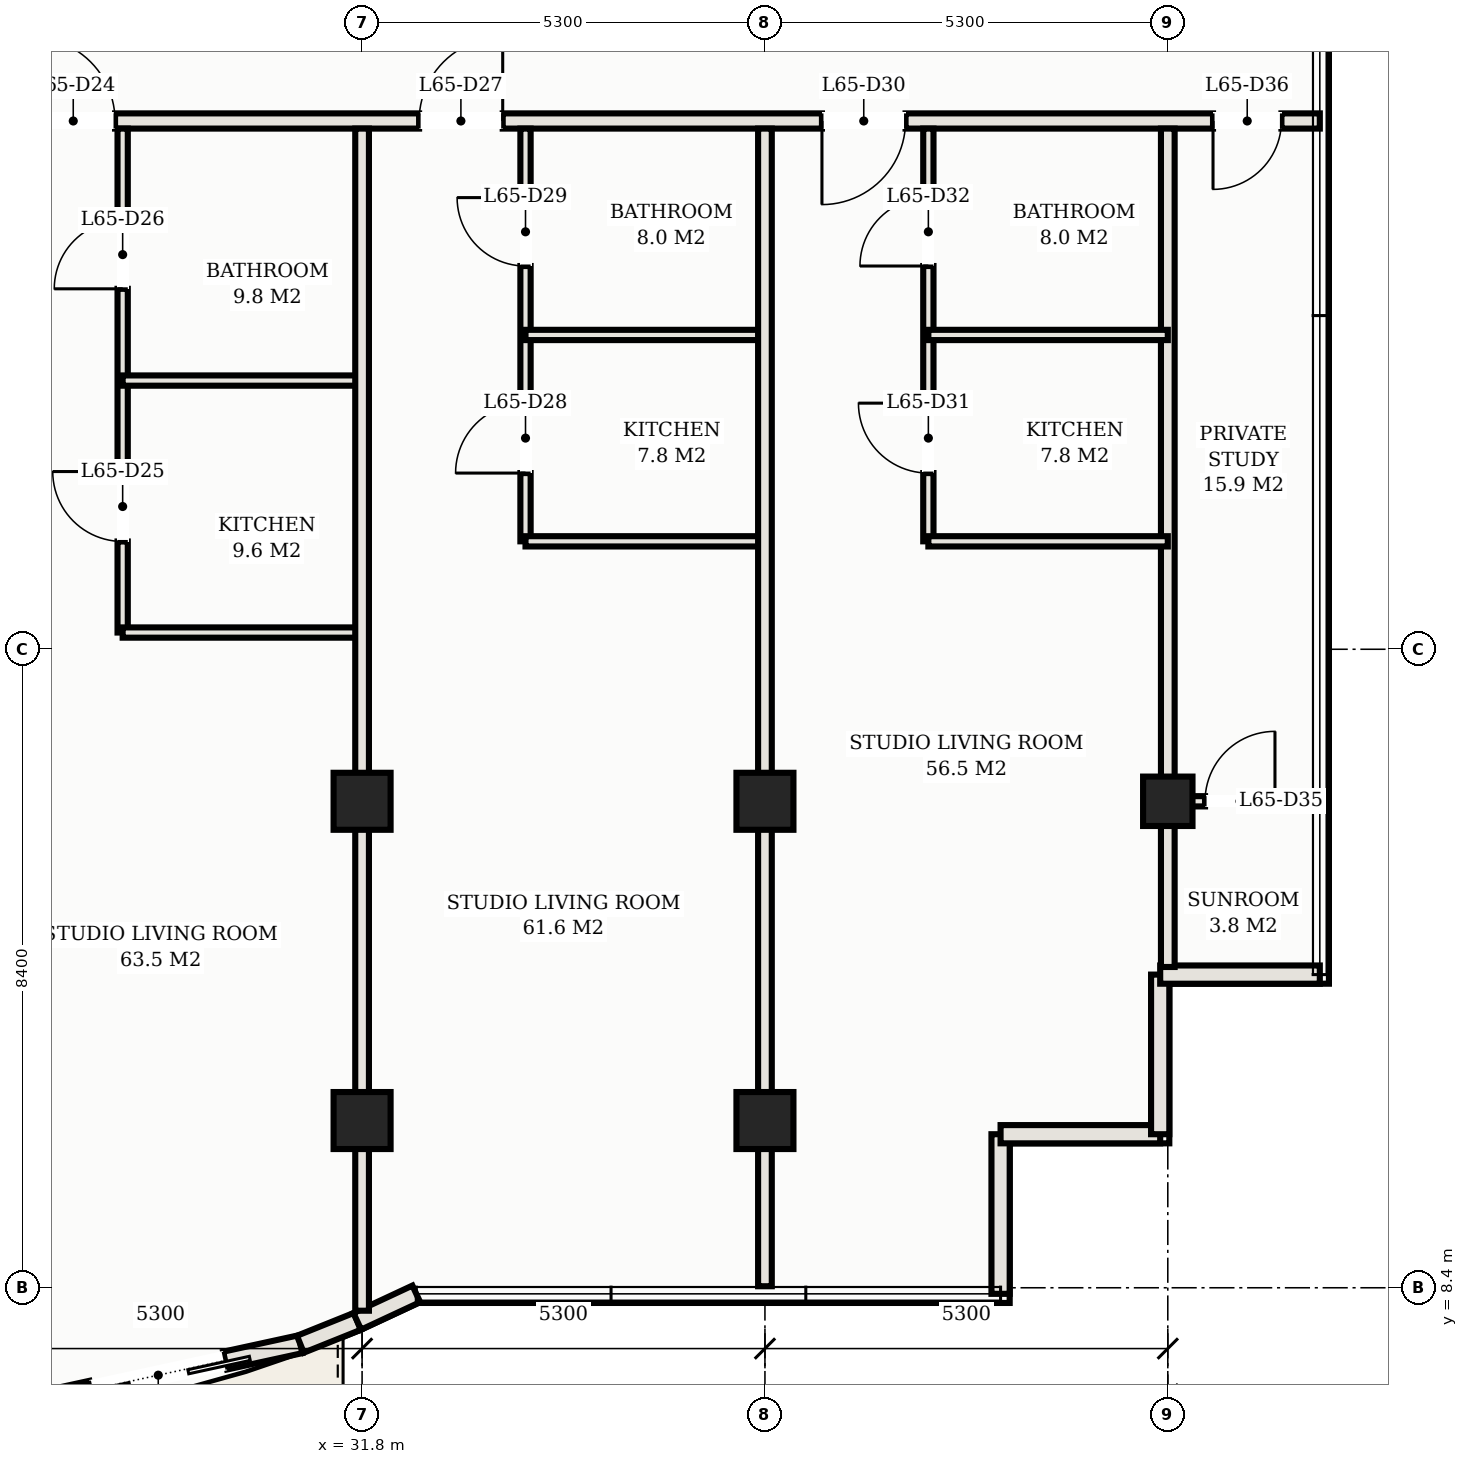
"""IFC4 building model, lengths in metres.
Left out: names, types, materials, properties, quantities, classifications, styles, units other than length and angle.
Written with IfcOpenShell. Run it as: python <this file> out.ifc"""

import sys

from ifc_helpers import new_model, si_unit, direction, frame, frame_2d, origin, origin_2d, place, context, subcontext, project, spatial, rectangle, hollow_rectangle, extrude, element, fill, save


model = new_model("IFC4")
c1 = context("Model", 3, precision=1e-05, world=origin(), true_north=direction((0.0, 1.0)))
c2 = subcontext(c1, "Body", "Model", "MODEL_VIEW")
j1 = project(units=[si_unit("LENGTHUNIT", "METRE"), si_unit("PLANEANGLEUNIT", "RADIAN")], contexts=[c1])
p1 = place(None, origin())
s1 = spatial("IfcSite", under=j1, at=p1, CompositionType="ELEMENT")
p2 = place(p1, origin())
s2 = spatial("IfcBuilding", under=s1, at=p2, CompositionType="ELEMENT")
p3 = place(p2, frame((0.0, 0.0, 236.3)))
s3 = spatial("IfcBuildingStorey", under=s2, at=p3, CompositionType="ELEMENT", Elevation=236.3)
for number, where, z_axis, x_axis in (
    (1, (31.8, 14.8, 0.0), (0.0, 0.0, 1.0), (1.0, 0.0, 0.0)),
    (2, (31.8, 10.6, 0.0), (0.0, 0.0, 1.0), (1.0, 0.0, 0.0)),
    (3, (37.1, 14.8, 0.0), (0.0, 0.0, 1.0), (1.0, 0.0, 0.0)),
    (4, (37.1, 10.6, 0.0), (0.0, 0.0, 1.0), (1.0, 0.0, 0.0)),
):
    element("IfcColumn", number, at=place(p3, frame(where, z_axis=z_axis, x_axis=x_axis)), inside=s3, PredefinedType="COLUMN", context=c2, shape_type="SweptSolid", body=[
        extrude(hollow_rectangle(XDim=0.75, YDim=0.75, WallThickness=0.025, at=origin_2d()), origin(), (0.0, 0.0, 1.0), 3.3),
    ])
p4 = place(p3, frame((42.4, 14.8, 0.0), z_axis=(0.0, 0.0, 1.0), x_axis=(1.0, 0.0, 0.0)))
e5 = element("IfcColumn", 5, at=p4, inside=s3, PredefinedType="COLUMN", context=c2, shape_type="SweptSolid", body=[
    extrude(hollow_rectangle(XDim=0.65, YDim=0.65, WallThickness=0.022, at=origin_2d()), origin(), (0.0, 0.0, 1.0), 3.3),
])
p5 = place(p3, frame((27.248, 6.843, 0.0), z_axis=(0.0, 0.0, 1.0), x_axis=(0.977126252677, 0.212660025225, 0.0)))
e6 = element("IfcWall", 6, at=p5, inside=s3, PredefinedType="SOLIDWALL", context=c2, shape_type="SweptSolid", body=[
    extrude(rectangle(XDim=3.828, YDim=0.24, at=frame_2d((1.914, 0.0))), origin(), (0.0, 0.0, 1.0), 3.11),
])
p6 = place(p5, frame((1.014, 0.0, 0.0)))
e7 = element("IfcOpeningElement", 7, at=p6, cuts=e6, PredefinedType="OPENING", context=c2, shape_type="SweptSolid", body=[
    extrude(rectangle(XDim=1.8, YDim=2.2, at=frame_2d((0.9, 1.1))), frame((0.0, 0.13, 0.0), z_axis=(0.0, -1.0, 0.0), x_axis=(1.0, 0.0, 0.0)), (0.0, 0.0, 1.0), 0.26),
])
p7 = place(p3, frame((30.988, 7.657, 0.0), z_axis=(0.0, 0.0, 1.0), x_axis=(0.927870589467, 0.372902358805, 0.0)))
e8 = element("IfcWall", 8, at=p7, inside=s3, PredefinedType="SOLIDWALL", context=c2, shape_type="SweptSolid", body=[
    extrude(rectangle(XDim=0.807, YDim=0.24, at=frame_2d((0.404, 0.0))), origin(), (0.0, 0.0, 1.0), 3.11),
])
p8 = place(p3, frame((31.737, 7.958, 0.0), z_axis=(0.0, 0.0, 1.0), x_axis=(0.906190424584, 0.422869855147, 0.0)))
e9 = element("IfcWall", 9, at=p8, inside=s3, PredefinedType="SOLIDWALL", context=c2, shape_type="SweptSolid", body=[
    extrude(rectangle(XDim=0.856, YDim=0.24, at=frame_2d((0.428, 0.0))), origin(), (0.0, 0.0, 1.0), 3.11),
])
p9 = place(p3, frame((40.2, 8.32, 0.0), z_axis=(0.0, 0.0, 1.0), x_axis=(0.0, 1.0, 0.0)))
e10 = element("IfcWall", 10, at=p9, inside=s3, PredefinedType="SOLIDWALL", context=c2, shape_type="SweptSolid", body=[
    extrude(rectangle(XDim=2.1, YDim=0.24, at=frame_2d((1.05, 0.0))), origin(), (0.0, 0.0, 1.0), 3.11),
])
for number, where, z_axis, x_axis in (
    (11, (40.2, 10.42, 0.0), (0.0, 0.0, 1.0), (1.0, 0.0, 0.0)),
    (12, (42.3, 10.42, 0.0), (0.0, 0.0, 1.0), (0.0, 1.0, 0.0)),
):
    element("IfcWall", number, at=place(p3, frame(where, z_axis=z_axis, x_axis=x_axis)), inside=s3, PredefinedType="SOLIDWALL", context=c2, shape_type="SweptSolid", body=[
        extrude(rectangle(XDim=2.1, YDim=0.24, at=frame_2d((1.05, 0.0))), origin(), (0.0, 0.0, 1.0), 3.11),
    ])
p10 = place(p3, frame((42.3, 12.52, 0.0), z_axis=(0.0, 0.0, 1.0), x_axis=(1.0, 0.0, 0.0)))
e13 = element("IfcWall", 13, at=p10, inside=s3, PredefinedType="SOLIDWALL", context=c2, shape_type="SweptSolid", body=[
    extrude(rectangle(XDim=2.1, YDim=0.24, at=frame_2d((1.05, 0.0))), origin(), (0.0, 0.0, 1.0), 3.11),
])
p11 = place(p3, frame((8.6, 23.75, 0.0), z_axis=(0.0, 0.0, 1.0), x_axis=(1.0, 0.0, 0.0)))
e14 = element("IfcWall", 14, at=p11, inside=s3, PredefinedType="PARTITIONING", context=c2, shape_type="SweptSolid", body=[
    extrude(rectangle(XDim=35.8, YDim=0.2, at=frame_2d((17.9, 0.0))), origin(), (0.0, 0.0, 1.0), 2.45),
])
p12 = place(p11, frame((2.75, 0.0, 0.0)))
e15 = element("IfcOpeningElement", 15, at=p12, cuts=e14, PredefinedType="OPENING", context=c2, shape_type="SweptSolid", body=[
    extrude(rectangle(XDim=1.1, YDim=2.25, at=frame_2d((0.55, 1.125))), frame((0.0, 0.11, 0.0), z_axis=(0.0, -1.0, 0.0), x_axis=(1.0, 0.0, 0.0)), (0.0, 0.0, 1.0), 0.22),
])
p13 = place(p11, frame((8.05, 0.0, 0.0)))
e16 = element("IfcOpeningElement", 16, at=p13, cuts=e14, PredefinedType="OPENING", context=c2, shape_type="SweptSolid", body=[
    extrude(rectangle(XDim=1.1, YDim=2.25, at=frame_2d((0.55, 1.125))), frame((0.0, 0.11, 0.0), z_axis=(0.0, -1.0, 0.0), x_axis=(1.0, 0.0, 0.0)), (0.0, 0.0, 1.0), 0.22),
])
p14 = place(p11, frame((13.35, 0.0, 0.0)))
e17 = element("IfcOpeningElement", 17, at=p14, cuts=e14, PredefinedType="OPENING", context=c2, shape_type="SweptSolid", body=[
    extrude(rectangle(XDim=1.1, YDim=2.25, at=frame_2d((0.55, 1.125))), frame((0.0, 0.11, 0.0), z_axis=(0.0, -1.0, 0.0), x_axis=(1.0, 0.0, 0.0)), (0.0, 0.0, 1.0), 0.22),
])
p15 = place(p11, frame((18.85, 0.0, 0.0)))
e18 = element("IfcOpeningElement", 18, at=p15, cuts=e14, PredefinedType="OPENING", context=c2, shape_type="SweptSolid", body=[
    extrude(rectangle(XDim=1.1, YDim=2.25, at=frame_2d((0.55, 1.125))), frame((0.0, 0.11, 0.0), z_axis=(0.0, -1.0, 0.0), x_axis=(1.0, 0.0, 0.0)), (0.0, 0.0, 1.0), 0.22),
])
p16 = place(p11, frame((23.95, 0.0, 0.0)))
e19 = element("IfcOpeningElement", 19, at=p16, cuts=e14, PredefinedType="OPENING", context=c2, shape_type="SweptSolid", body=[
    extrude(rectangle(XDim=1.1, YDim=2.25, at=frame_2d((0.55, 1.125))), frame((0.0, 0.11, 0.0), z_axis=(0.0, -1.0, 0.0), x_axis=(1.0, 0.0, 0.0)), (0.0, 0.0, 1.0), 0.22),
])
p17 = place(p11, frame((29.25, 0.0, 0.0)))
e20 = element("IfcOpeningElement", 20, at=p17, cuts=e14, PredefinedType="OPENING", context=c2, shape_type="SweptSolid", body=[
    extrude(rectangle(XDim=1.1, YDim=2.25, at=frame_2d((0.55, 1.125))), frame((0.0, 0.11, 0.0), z_axis=(0.0, -1.0, 0.0), x_axis=(1.0, 0.0, 0.0)), (0.0, 0.0, 1.0), 0.22),
])
p18 = place(p11, frame((0.505, 0.0, 0.0)))
e21 = element("IfcOpeningElement", 21, at=p18, cuts=e14, PredefinedType="OPENING", context=c2, shape_type="SweptSolid", body=[
    extrude(rectangle(XDim=0.9, YDim=2.15, at=frame_2d((0.45, 1.075))), frame((0.0, 0.11, 0.0), z_axis=(0.0, -1.0, 0.0), x_axis=(1.0, 0.0, 0.0)), (0.0, 0.0, 1.0), 0.22),
])
p19 = place(p11, frame((34.395, 0.0, 0.0)))
e22 = element("IfcOpeningElement", 22, at=p19, cuts=e14, PredefinedType="OPENING", context=c2, shape_type="SweptSolid", body=[
    extrude(rectangle(XDim=0.9, YDim=2.15, at=frame_2d((0.45, 1.075))), frame((0.0, 0.11, 0.0), z_axis=(0.0, -1.0, 0.0), x_axis=(1.0, 0.0, 0.0)), (0.0, 0.0, 1.0), 0.22),
])
p20 = place(p3, frame((42.4, 12.62, 0.0), z_axis=(0.0, 0.0, 1.0), x_axis=(0.0, 1.0, 0.0)))
e23 = element("IfcWall", 23, at=p20, inside=s3, PredefinedType="PARTITIONING", context=c2, shape_type="SweptSolid", body=[
    extrude(rectangle(XDim=11.03, YDim=0.18, at=frame_2d((5.515, 0.0))), origin(), (0.0, 0.0, 1.0), 2.45),
])
p21 = place(p3, frame((28.65, 17.02, 0.0), z_axis=(0.0, 0.0, 1.0), x_axis=(0.0, 1.0, 0.0)))
e24 = element("IfcWall", 24, at=p21, inside=s3, PredefinedType="PARTITIONING", context=c2, shape_type="SweptSolid", body=[
    extrude(rectangle(XDim=6.63, YDim=0.135, at=frame_2d((3.315, 0.0))), origin(), (0.0, 0.0, 1.0), 2.45),
])
p22 = place(p21, frame((1.198, 0.0, 0.0)))
e25 = element("IfcOpeningElement", 25, at=p22, cuts=e24, PredefinedType="OPENING", context=c2, shape_type="SweptSolid", body=[
    extrude(rectangle(XDim=0.92, YDim=2.15, at=frame_2d((0.46, 1.075))), frame((0.0, 0.078, 0.0), z_axis=(0.0, -1.0, 0.0), x_axis=(1.0, 0.0, 0.0)), (0.0, 0.0, 1.0), 0.155),
])
p23 = place(p21, frame((4.522, 0.0, 0.0)))
e26 = element("IfcOpeningElement", 26, at=p23, cuts=e24, PredefinedType="OPENING", context=c2, shape_type="SweptSolid", body=[
    extrude(rectangle(XDim=0.9, YDim=2.15, at=frame_2d((0.45, 1.075))), frame((0.0, 0.078, 0.0), z_axis=(0.0, -1.0, 0.0), x_axis=(1.0, 0.0, 0.0)), (0.0, 0.0, 1.0), 0.155),
])
for number, where, z_axis, x_axis in (
    (27, (28.65, 17.02, 0.0), (0.0, 0.0, 1.0), (1.0, 0.0, 0.0)),
    (28, (28.65, 20.335, 0.0), (0.0, 0.0, 1.0), (1.0, 0.0, 0.0)),
):
    element("IfcWall", number, at=place(p3, frame(where, z_axis=z_axis, x_axis=x_axis)), inside=s3, PredefinedType="PARTITIONING", context=c2, shape_type="SweptSolid", body=[
        extrude(rectangle(XDim=3.15, YDim=0.135, at=frame_2d((1.575, 0.0))), origin(), (0.0, 0.0, 1.0), 2.45),
    ])
p24 = place(p3, frame((31.8, 8.098, 0.0), z_axis=(0.0, 0.0, 1.0), x_axis=(0.0, 1.0, 0.0)))
e29 = element("IfcWall", 29, at=p24, inside=s3, PredefinedType="PARTITIONING", context=c2, shape_type="SweptSolid", body=[
    extrude(rectangle(XDim=15.552, YDim=0.18, at=frame_2d((7.776, 0.0))), origin(), (0.0, 0.0, 1.0), 2.45),
])
p25 = place(p3, frame((33.95, 18.22, 0.0), z_axis=(0.0, 0.0, 1.0), x_axis=(0.0, 1.0, 0.0)))
e30 = element("IfcWall", 30, at=p25, inside=s3, PredefinedType="PARTITIONING", context=c2, shape_type="SweptSolid", body=[
    extrude(rectangle(XDim=5.43, YDim=0.135, at=frame_2d((2.715, 0.0))), origin(), (0.0, 0.0, 1.0), 2.45),
])
p26 = place(p25, frame((0.898, 0.0, 0.0)))
e31 = element("IfcOpeningElement", 31, at=p26, cuts=e30, PredefinedType="OPENING", context=c2, shape_type="SweptSolid", body=[
    extrude(rectangle(XDim=0.92, YDim=2.15, at=frame_2d((0.46, 1.075))), frame((0.0, 0.078, 0.0), z_axis=(0.0, -1.0, 0.0), x_axis=(1.0, 0.0, 0.0)), (0.0, 0.0, 1.0), 0.155),
])
p27 = place(p25, frame((3.622, 0.0, 0.0)))
e32 = element("IfcOpeningElement", 32, at=p27, cuts=e30, PredefinedType="OPENING", context=c2, shape_type="SweptSolid", body=[
    extrude(rectangle(XDim=0.9, YDim=2.15, at=frame_2d((0.45, 1.075))), frame((0.0, 0.078, 0.0), z_axis=(0.0, -1.0, 0.0), x_axis=(1.0, 0.0, 0.0)), (0.0, 0.0, 1.0), 0.155),
])
for number, where, z_axis, x_axis in (
    (33, (33.95, 18.22, 0.0), (0.0, 0.0, 1.0), (1.0, 0.0, 0.0)),
    (34, (33.95, 20.935, 0.0), (0.0, 0.0, 1.0), (1.0, 0.0, 0.0)),
):
    element("IfcWall", number, at=place(p3, frame(where, z_axis=z_axis, x_axis=x_axis)), inside=s3, PredefinedType="PARTITIONING", context=c2, shape_type="SweptSolid", body=[
        extrude(rectangle(XDim=3.15, YDim=0.135, at=frame_2d((1.575, 0.0))), origin(), (0.0, 0.0, 1.0), 2.45),
    ])
p28 = place(p3, frame((37.1, 8.42, 0.0), z_axis=(0.0, 0.0, 1.0), x_axis=(0.0, 1.0, 0.0)))
e35 = element("IfcWall", 35, at=p28, inside=s3, PredefinedType="PARTITIONING", context=c2, shape_type="SweptSolid", body=[
    extrude(rectangle(XDim=15.23, YDim=0.18, at=frame_2d((7.615, 0.0))), origin(), (0.0, 0.0, 1.0), 2.45),
])
p29 = place(p3, frame((39.25, 18.22, 0.0), z_axis=(0.0, 0.0, 1.0), x_axis=(0.0, 1.0, 0.0)))
e36 = element("IfcWall", 36, at=p29, inside=s3, PredefinedType="PARTITIONING", context=c2, shape_type="SweptSolid", body=[
    extrude(rectangle(XDim=5.43, YDim=0.135, at=frame_2d((2.715, 0.0))), origin(), (0.0, 0.0, 1.0), 2.45),
])
p30 = place(p29, frame((0.898, 0.0, 0.0)))
e37 = element("IfcOpeningElement", 37, at=p30, cuts=e36, PredefinedType="OPENING", context=c2, shape_type="SweptSolid", body=[
    extrude(rectangle(XDim=0.92, YDim=2.15, at=frame_2d((0.46, 1.075))), frame((0.0, 0.078, 0.0), z_axis=(0.0, -1.0, 0.0), x_axis=(1.0, 0.0, 0.0)), (0.0, 0.0, 1.0), 0.155),
])
p31 = place(p29, frame((3.622, 0.0, 0.0)))
e38 = element("IfcOpeningElement", 38, at=p31, cuts=e36, PredefinedType="OPENING", context=c2, shape_type="SweptSolid", body=[
    extrude(rectangle(XDim=0.9, YDim=2.15, at=frame_2d((0.45, 1.075))), frame((0.0, 0.078, 0.0), z_axis=(0.0, -1.0, 0.0), x_axis=(1.0, 0.0, 0.0)), (0.0, 0.0, 1.0), 0.155),
])
for number, where, z_axis, x_axis in (
    (39, (39.25, 18.22, 0.0), (0.0, 0.0, 1.0), (1.0, 0.0, 0.0)),
    (40, (39.25, 20.935, 0.0), (0.0, 0.0, 1.0), (1.0, 0.0, 0.0)),
):
    element("IfcWall", number, at=place(p3, frame(where, z_axis=z_axis, x_axis=x_axis)), inside=s3, PredefinedType="PARTITIONING", context=c2, shape_type="SweptSolid", body=[
        extrude(rectangle(XDim=3.15, YDim=0.135, at=frame_2d((1.575, 0.0))), origin(), (0.0, 0.0, 1.0), 2.45),
    ])
p32 = place(p3, frame((42.4, 14.8, 0.0), z_axis=(0.0, 0.0, 1.0), x_axis=(1.0, 0.0, 0.0)))
e41 = element("IfcWall", 41, at=p32, inside=s3, PredefinedType="PARTITIONING", context=c2, shape_type="SweptSolid", body=[
    extrude(rectangle(XDim=1.9, YDim=0.135, at=frame_2d((0.95, 0.0))), origin(), (0.0, 0.0, 1.0), 2.45),
])
p33 = place(p32, frame((0.49, 0.0, 0.0)))
e42 = element("IfcOpeningElement", 42, at=p33, cuts=e41, PredefinedType="OPENING", context=c2, shape_type="SweptSolid", body=[
    extrude(rectangle(XDim=0.92, YDim=2.15, at=frame_2d((0.46, 1.075))), frame((0.0, 0.078, 0.0), z_axis=(0.0, -1.0, 0.0), x_axis=(1.0, 0.0, 0.0)), (0.0, 0.0, 1.0), 0.155),
])
p34 = place(p6, frame((1.8, 0.0, 0.0), z_axis=(0.0, 0.0, 1.0), x_axis=(-1.0, 0.0, 0.0)))
e43 = element("IfcDoor", 43, at=p34, inside=s3, OperationType="DOUBLE_DOOR_SLIDING", PredefinedType="DOOR", context=c2, shape_type="SweptSolid", body=[
    extrude(rectangle(XDim=1.8, YDim=2.2, at=frame_2d((0.9, 1.1))), frame((0.0, 0.025, 0.0), z_axis=(0.0, -1.0, 0.0), x_axis=(1.0, 0.0, 0.0)), (0.0, 0.0, 1.0), 0.05),
])
fill(e7, e43)
p35 = place(p15, origin())
e44 = element("IfcDoor", 44, at=p35, inside=s3, OperationType="SINGLE_SWING_LEFT", PredefinedType="DOOR", context=c2, shape_type="SweptSolid", body=[
    extrude(rectangle(XDim=1.1, YDim=2.25, at=frame_2d((0.55, 1.125))), frame((0.0, 0.025, 0.0), z_axis=(0.0, -1.0, 0.0), x_axis=(1.0, 0.0, 0.0)), (0.0, 0.0, 1.0), 0.05),
])
fill(e18, e44)
p36 = place(p22, origin())
e45 = element("IfcDoor", 45, at=p36, inside=s3, OperationType="SINGLE_SWING_RIGHT", PredefinedType="DOOR", context=c2, shape_type="SweptSolid", body=[
    extrude(rectangle(XDim=0.92, YDim=2.15, at=frame_2d((0.46, 1.075))), frame((0.0, 0.025, 0.0), z_axis=(0.0, -1.0, 0.0), x_axis=(1.0, 0.0, 0.0)), (0.0, 0.0, 1.0), 0.05),
])
fill(e25, e45)
p37 = place(p23, origin())
e46 = element("IfcDoor", 46, at=p37, inside=s3, OperationType="SINGLE_SWING_LEFT", PredefinedType="DOOR", context=c2, shape_type="SweptSolid", body=[
    extrude(rectangle(XDim=0.9, YDim=2.15, at=frame_2d((0.45, 1.075))), frame((0.0, 0.025, 0.0), z_axis=(0.0, -1.0, 0.0), x_axis=(1.0, 0.0, 0.0)), (0.0, 0.0, 1.0), 0.05),
])
fill(e26, e46)
p38 = place(p16, origin())
e47 = element("IfcDoor", 47, at=p38, inside=s3, OperationType="SINGLE_SWING_RIGHT", PredefinedType="DOOR", context=c2, shape_type="SweptSolid", body=[
    extrude(rectangle(XDim=1.1, YDim=2.25, at=frame_2d((0.55, 1.125))), frame((0.0, 0.025, 0.0), z_axis=(0.0, -1.0, 0.0), x_axis=(1.0, 0.0, 0.0)), (0.0, 0.0, 1.0), 0.05),
])
fill(e19, e47)
p39 = place(p26, origin())
e48 = element("IfcDoor", 48, at=p39, inside=s3, OperationType="SINGLE_SWING_LEFT", PredefinedType="DOOR", context=c2, shape_type="SweptSolid", body=[
    extrude(rectangle(XDim=0.92, YDim=2.15, at=frame_2d((0.46, 1.075))), frame((0.0, 0.025, 0.0), z_axis=(0.0, -1.0, 0.0), x_axis=(1.0, 0.0, 0.0)), (0.0, 0.0, 1.0), 0.05),
])
fill(e31, e48)
p40 = place(p27, origin())
e49 = element("IfcDoor", 49, at=p40, inside=s3, OperationType="SINGLE_SWING_RIGHT", PredefinedType="DOOR", context=c2, shape_type="SweptSolid", body=[
    extrude(rectangle(XDim=0.9, YDim=2.15, at=frame_2d((0.45, 1.075))), frame((0.0, 0.025, 0.0), z_axis=(0.0, -1.0, 0.0), x_axis=(1.0, 0.0, 0.0)), (0.0, 0.0, 1.0), 0.05),
])
fill(e32, e49)
p41 = place(p17, frame((1.1, 0.0, 0.0), z_axis=(0.0, 0.0, 1.0), x_axis=(-1.0, 0.0, 0.0)))
e50 = element("IfcDoor", 50, at=p41, inside=s3, OperationType="SINGLE_SWING_RIGHT", PredefinedType="DOOR", context=c2, shape_type="SweptSolid", body=[
    extrude(rectangle(XDim=1.1, YDim=2.25, at=frame_2d((0.55, 1.125))), frame((0.0, 0.025, 0.0), z_axis=(0.0, -1.0, 0.0), x_axis=(1.0, 0.0, 0.0)), (0.0, 0.0, 1.0), 0.05),
])
fill(e20, e50)
p42 = place(p30, origin())
e51 = element("IfcDoor", 51, at=p42, inside=s3, OperationType="SINGLE_SWING_RIGHT", PredefinedType="DOOR", context=c2, shape_type="SweptSolid", body=[
    extrude(rectangle(XDim=0.92, YDim=2.15, at=frame_2d((0.46, 1.075))), frame((0.0, 0.025, 0.0), z_axis=(0.0, -1.0, 0.0), x_axis=(1.0, 0.0, 0.0)), (0.0, 0.0, 1.0), 0.05),
])
fill(e37, e51)
p43 = place(p31, origin())
e52 = element("IfcDoor", 52, at=p43, inside=s3, OperationType="SINGLE_SWING_LEFT", PredefinedType="DOOR", context=c2, shape_type="SweptSolid", body=[
    extrude(rectangle(XDim=0.9, YDim=2.15, at=frame_2d((0.45, 1.075))), frame((0.0, 0.025, 0.0), z_axis=(0.0, -1.0, 0.0), x_axis=(1.0, 0.0, 0.0)), (0.0, 0.0, 1.0), 0.05),
])
fill(e38, e52)
p44 = place(p33, origin())
e53 = element("IfcDoor", 53, at=p44, inside=s3, OperationType="SINGLE_SWING_RIGHT", PredefinedType="DOOR", context=c2, shape_type="SweptSolid", body=[
    extrude(rectangle(XDim=0.92, YDim=2.15, at=frame_2d((0.46, 1.075))), frame((0.0, 0.025, 0.0), z_axis=(0.0, -1.0, 0.0), x_axis=(1.0, 0.0, 0.0)), (0.0, 0.0, 1.0), 0.05),
])
fill(e42, e53)
p45 = place(p19, frame((0.9, 0.0, 0.0), z_axis=(0.0, 0.0, 1.0), x_axis=(-1.0, 0.0, 0.0)))
e54 = element("IfcDoor", 54, at=p45, inside=s3, OperationType="SINGLE_SWING_RIGHT", PredefinedType="DOOR", context=c2, shape_type="SweptSolid", body=[
    extrude(rectangle(XDim=0.9, YDim=2.15, at=frame_2d((0.45, 1.075))), frame((0.0, 0.025, 0.0), z_axis=(0.0, -1.0, 0.0), x_axis=(1.0, 0.0, 0.0)), (0.0, 0.0, 1.0), 0.05),
])
fill(e22, e54)
save(model, sys.argv[1])
